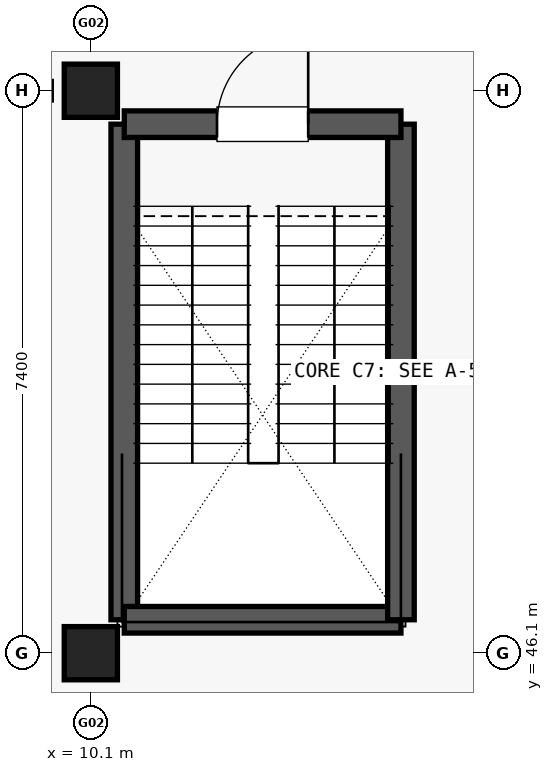
"""IFC4 building model, lengths in metres.
Left out: names, types, materials, properties, quantities, classifications, styles, units other than length and angle.
Written with IfcOpenShell. Run it as: python <this file> out.ifc"""

import sys

from ifc_helpers import new_model, si_unit, direction, frame, frame_2d, origin, origin_2d, place, context, subcontext, project, spatial, rectangle, extrude, element, fill, save


model = new_model("IFC4")
c1 = context("Model", 3, precision=1e-05, world=origin(), true_north=direction((0.0, 1.0)))
c2 = subcontext(c1, "Body", "Model", "MODEL_VIEW")
j1 = project(units=[si_unit("LENGTHUNIT", "METRE"), si_unit("PLANEANGLEUNIT", "RADIAN")], contexts=[c1])
p1 = place(None, origin())
s1 = spatial("IfcSite", under=j1, at=p1, CompositionType="ELEMENT")
p2 = place(p1, origin())
s2 = spatial("IfcBuilding", under=s1, at=p2, CompositionType="ELEMENT")
p3 = place(p2, frame((0.0, 0.0, 5.4)))
s3 = spatial("IfcBuildingStorey", under=s2, at=p3, CompositionType="ELEMENT", Elevation=5.4)
for number, where, z_axis, x_axis in (
    (1, (10.1, 46.1, 0.0), (0.0, 0.0, 1.0), (1.0, 0.0, 0.0)),
    (2, (10.1, 53.5, 0.0), (0.0, 0.0, 1.0), (1.0, 0.0, 0.0)),
):
    element("IfcColumn", number, at=place(p3, frame(where, z_axis=z_axis, x_axis=x_axis)), inside=s3, PredefinedType="COLUMN", context=c2, shape_type="SweptSolid", body=[
        extrude(rectangle(XDim=0.7, YDim=0.7, at=origin_2d()), origin(), (0.0, 0.0, 1.0), 4.56),
    ])
p4 = place(p3, frame((10.54, 46.54, 0.0), z_axis=(0.0, 0.0, 1.0), x_axis=(0.0, 1.0, 0.0)))
e3 = element("IfcWall", 3, at=p4, inside=s3, PredefinedType="SHEAR", context=c2, shape_type="SweptSolid", body=[
    extrude(rectangle(XDim=6.52, YDim=0.35, at=frame_2d((3.26, 0.0))), origin(), (0.0, 0.0, 1.0), 4.555),
])
p5 = place(p3, frame((10.54, 46.54, 0.0), z_axis=(0.0, 0.0, 1.0), x_axis=(1.0, 0.0, 0.0)))
e4 = element("IfcWall", 4, at=p5, inside=s3, PredefinedType="SHEAR", context=c2, shape_type="SweptSolid", body=[
    extrude(rectangle(XDim=3.64, YDim=0.35, at=frame_2d((1.82, 0.0))), origin(), (0.0, 0.0, 1.0), 4.555),
])
p6 = place(p3, frame((14.18, 46.54, 0.0), z_axis=(0.0, 0.0, 1.0), x_axis=(0.0, 1.0, 0.0)))
e5 = element("IfcWall", 5, at=p6, inside=s3, PredefinedType="SHEAR", context=c2, shape_type="SweptSolid", body=[
    extrude(rectangle(XDim=6.52, YDim=0.35, at=frame_2d((3.26, 0.0))), origin(), (0.0, 0.0, 1.0), 4.555),
])
p7 = place(p3, frame((10.54, 53.06, 0.0), z_axis=(0.0, 0.0, 1.0), x_axis=(1.0, 0.0, 0.0)))
e6 = element("IfcWall", 6, at=p7, inside=s3, PredefinedType="SHEAR", context=c2, shape_type="SweptSolid", body=[
    extrude(rectangle(XDim=3.64, YDim=0.35, at=frame_2d((1.82, 0.0))), origin(), (0.0, 0.0, 1.0), 4.555),
])
p8 = place(p7, frame((1.22, 0.0, 0.0)))
e7 = element("IfcOpeningElement", 7, at=p8, cuts=e6, PredefinedType="OPENING", context=c2, shape_type="SweptSolid", body=[
    extrude(rectangle(XDim=1.2, YDim=2.15, at=frame_2d((0.6, 1.075))), frame((0.0, 0.185, 0.0), z_axis=(0.0, -1.0, 0.0), x_axis=(1.0, 0.0, 0.0)), (0.0, 0.0, 1.0), 0.37),
])
p9 = place(p8, origin())
e8 = element("IfcDoor", 8, at=p9, inside=s3, OperationType="SINGLE_SWING_RIGHT", PredefinedType="DOOR", context=c2, shape_type="SweptSolid", body=[
    extrude(rectangle(XDim=1.2, YDim=2.15, at=frame_2d((0.6, 1.075))), frame((0.0, 0.025, 0.0), z_axis=(0.0, -1.0, 0.0), x_axis=(1.0, 0.0, 0.0)), (0.0, 0.0, 1.0), 0.05),
])
fill(e7, e8)
save(model, sys.argv[1])
